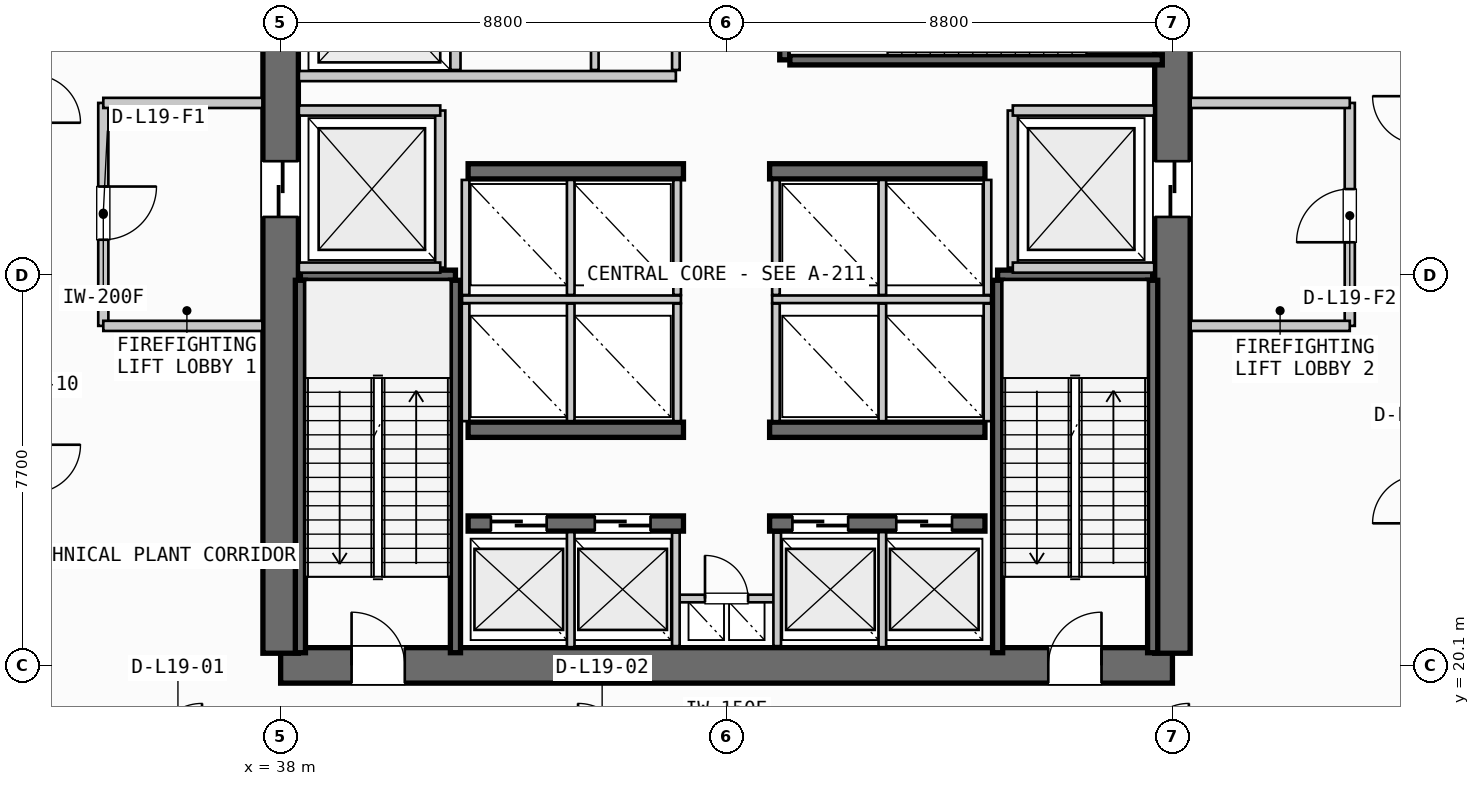
"""IFC4 building model, lengths in metres.
Left out: names, types, materials, properties, quantities, classifications, styles, units other than length and angle.
Written with IfcOpenShell. Run it as: python <this file> out.ifc"""

import sys

from ifc_helpers import new_model, si_unit, direction, frame, frame_2d, origin, place, context, subcontext, project, spatial, rectangle, extrude, source, transform, mapped, element, fill, save


model = new_model("IFC4")
c1 = context("Model", 3, precision=1e-05, world=origin(), true_north=direction((0.0, 1.0)))
c2 = subcontext(c1, "Body", "Model", "MODEL_VIEW")
j1 = project(units=[si_unit("LENGTHUNIT", "METRE"), si_unit("PLANEANGLEUNIT", "RADIAN")], contexts=[c1])
p1 = place(None, origin())
s1 = spatial("IfcSite", under=j1, at=p1, CompositionType="ELEMENT")
p2 = place(p1, origin())
s2 = spatial("IfcBuilding", under=s1, at=p2, CompositionType="ELEMENT")
p3 = place(p2, frame((0.0, 0.0, 80.4)))
s3 = spatial("IfcBuildingStorey", under=s2, at=p3, CompositionType="ELEMENT", Elevation=80.4)
p4 = place(p3, frame((38.0, 20.1, 0.0), z_axis=(0.0, 0.0, 1.0), x_axis=(1.0, 0.0, 0.0)))
e1 = element("IfcWall", 1, at=p4, inside=s3, PredefinedType="SHEAR", context=c2, shape_type="SweptSolid", body=[
    extrude(rectangle(XDim=17.6, YDim=0.7, at=frame_2d((8.8, 0.0))), origin(), (0.0, 0.0, 1.0), 4.76),
])
p5 = place(p4, frame((1.4, 0.0, 0.0)))
e2 = element("IfcOpeningElement", 2, at=p5, cuts=e1, PredefinedType="OPENING", context=c2, shape_type="SweptSolid", body=[
    extrude(rectangle(XDim=1.05, YDim=2.15, at=frame_2d((0.525, 1.075))), frame((0.0, 0.36, 0.0), z_axis=(0.0, -1.0, 0.0), x_axis=(1.0, 0.0, 0.0)), (0.0, 0.0, 1.0), 0.72),
])
p6 = place(p4, frame((15.15, 0.0, 0.0)))
e3 = element("IfcOpeningElement", 3, at=p6, cuts=e1, PredefinedType="OPENING", context=c2, shape_type="SweptSolid", body=[
    extrude(rectangle(XDim=1.05, YDim=2.15, at=frame_2d((0.525, 1.075))), frame((0.0, 0.36, 0.0), z_axis=(0.0, -1.0, 0.0), x_axis=(1.0, 0.0, 0.0)), (0.0, 0.0, 1.0), 0.72),
])
p7 = place(p3, frame((38.0, 35.26, 0.0), z_axis=(0.0, 0.0, 1.0), x_axis=(0.0, -1.0, 0.0)))
e4 = element("IfcWall", 4, at=p7, inside=s3, PredefinedType="SHEAR", context=c2, shape_type="SweptSolid", body=[
    extrude(rectangle(XDim=14.92, YDim=0.7, at=frame_2d((7.46, 0.0))), origin(), (0.0, 0.0, 1.0), 4.76),
])
p8 = place(p7, frame((5.21, 0.0, 0.0)))
e5 = element("IfcOpeningElement", 5, at=p8, cuts=e4, PredefinedType="OPENING", context=c2, shape_type="SweptSolid", body=[
    extrude(rectangle(XDim=1.1, YDim=2.2, at=frame_2d((0.55, 1.1))), frame((0.0, 0.36, 0.0), z_axis=(0.0, -1.0, 0.0), x_axis=(1.0, 0.0, 0.0)), (0.0, 0.0, 1.0), 0.72),
])
p9 = place(p3, frame((55.6, 20.34, 0.0), z_axis=(0.0, 0.0, 1.0), x_axis=(0.0, 1.0, 0.0)))
e6 = element("IfcWall", 6, at=p9, inside=s3, PredefinedType="SHEAR", context=c2, shape_type="SweptSolid", body=[
    extrude(rectangle(XDim=14.92, YDim=0.7, at=frame_2d((7.46, 0.0))), origin(), (0.0, 0.0, 1.0), 4.76),
])
p10 = place(p9, frame((12.71, 0.0, 0.0)))
e7 = element("IfcOpeningElement", 7, at=p10, cuts=e6, PredefinedType="OPENING", context=c2, shape_type="SweptSolid", body=[
    extrude(rectangle(XDim=1.05, YDim=2.15, at=frame_2d((0.525, 1.075))), frame((0.0, 0.36, 0.0), z_axis=(0.0, -1.0, 0.0), x_axis=(1.0, 0.0, 0.0)), (0.0, 0.0, 1.0), 0.72),
])
p11 = place(p9, frame((8.61, 0.0, 0.0)))
e8 = element("IfcOpeningElement", 8, at=p11, cuts=e6, PredefinedType="OPENING", context=c2, shape_type="SweptSolid", body=[
    extrude(rectangle(XDim=1.1, YDim=2.2, at=frame_2d((0.55, 1.1))), frame((0.0, 0.36, 0.0), z_axis=(0.0, -1.0, 0.0), x_axis=(1.0, 0.0, 0.0)), (0.0, 0.0, 1.0), 0.72),
])
p12 = place(p3, frame((41.7, 22.9, 0.0), z_axis=(0.0, 0.0, 1.0), x_axis=(1.0, 0.0, 0.0)))
e9 = element("IfcWall", 9, at=p12, inside=s3, PredefinedType="SHEAR", context=c2, shape_type="SweptSolid", body=[
    extrude(rectangle(XDim=4.25, YDim=0.3, at=frame_2d((2.125, 0.0))), origin(), (0.0, 0.0, 1.0), 4.76),
])
p13 = place(p12, frame((0.45, 0.0, 0.0)))
e10 = element("IfcOpeningElement", 10, at=p13, cuts=e9, PredefinedType="OPENING", context=c2, shape_type="SweptSolid", body=[
    extrude(rectangle(XDim=1.1, YDim=2.2, at=frame_2d((0.55, 1.1))), frame((0.0, 0.16, 0.0), z_axis=(0.0, -1.0, 0.0), x_axis=(1.0, 0.0, 0.0)), (0.0, 0.0, 1.0), 0.32),
])
p14 = place(p12, frame((2.5, 0.0, 0.0)))
e11 = element("IfcOpeningElement", 11, at=p14, cuts=e9, PredefinedType="OPENING", context=c2, shape_type="SweptSolid", body=[
    extrude(rectangle(XDim=1.1, YDim=2.2, at=frame_2d((0.55, 1.1))), frame((0.0, 0.16, 0.0), z_axis=(0.0, -1.0, 0.0), x_axis=(1.0, 0.0, 0.0)), (0.0, 0.0, 1.0), 0.32),
])
p15 = place(p3, frame((47.65, 22.9, 0.0), z_axis=(0.0, 0.0, 1.0), x_axis=(1.0, 0.0, 0.0)))
e12 = element("IfcWall", 12, at=p15, inside=s3, PredefinedType="SHEAR", context=c2, shape_type="SweptSolid", body=[
    extrude(rectangle(XDim=4.25, YDim=0.3, at=frame_2d((2.125, 0.0))), origin(), (0.0, 0.0, 1.0), 4.76),
])
p16 = place(p15, frame((0.45, 0.0, 0.0)))
e13 = element("IfcOpeningElement", 13, at=p16, cuts=e12, PredefinedType="OPENING", context=c2, shape_type="SweptSolid", body=[
    extrude(rectangle(XDim=1.1, YDim=2.2, at=frame_2d((0.55, 1.1))), frame((0.0, 0.16, 0.0), z_axis=(0.0, -1.0, 0.0), x_axis=(1.0, 0.0, 0.0)), (0.0, 0.0, 1.0), 0.32),
])
p17 = place(p15, frame((2.5, 0.0, 0.0)))
e14 = element("IfcOpeningElement", 14, at=p17, cuts=e12, PredefinedType="OPENING", context=c2, shape_type="SweptSolid", body=[
    extrude(rectangle(XDim=1.1, YDim=2.2, at=frame_2d((0.55, 1.1))), frame((0.0, 0.16, 0.0), z_axis=(0.0, -1.0, 0.0), x_axis=(1.0, 0.0, 0.0)), (0.0, 0.0, 1.0), 0.32),
])
for number, where, z_axis, x_axis in (
    (15, (41.7, 24.75, 0.0), (0.0, 0.0, 1.0), (1.0, 0.0, 0.0)),
    (16, (47.65, 24.75, 0.0), (0.0, 0.0, 1.0), (1.0, 0.0, 0.0)),
    (17, (41.7, 29.85, 0.0), (0.0, 0.0, 1.0), (1.0, 0.0, 0.0)),
    (18, (47.65, 29.85, 0.0), (0.0, 0.0, 1.0), (1.0, 0.0, 0.0)),
):
    element("IfcWall", number, at=place(p3, frame(where, z_axis=z_axis, x_axis=x_axis)), inside=s3, PredefinedType="SHEAR", context=c2, shape_type="SweptSolid", body=[
        extrude(rectangle(XDim=4.25, YDim=0.3, at=frame_2d((2.125, 0.0))), origin(), (0.0, 0.0, 1.0), 4.76),
    ])
p18 = place(p3, frame((38.39, 27.8, 0.0), z_axis=(0.0, 0.0, 1.0), x_axis=(1.0, 0.0, 0.0)))
e19 = element("IfcWall", 19, at=p18, inside=s3, PredefinedType="SHEAR", context=c2, shape_type="SweptSolid", body=[
    extrude(rectangle(XDim=3.06, YDim=0.2, at=frame_2d((1.53, 0.0))), origin(), (0.0, 0.0, 1.0), 4.76),
])
for number, where, z_axis, x_axis in (
    (20, (41.45, 27.7, 0.0), (0.0, 0.0, 1.0), (0.0, -1.0, 0.0)),
    (21, (38.39, 20.35, 0.0), (0.0, 0.0, 1.0), (0.0, 1.0, 0.0)),
):
    element("IfcWall", number, at=place(p3, frame(where, z_axis=z_axis, x_axis=x_axis)), inside=s3, PredefinedType="SHEAR", context=c2, shape_type="SweptSolid", body=[
        extrude(rectangle(XDim=7.35, YDim=0.2, at=frame_2d((3.675, 0.0))), origin(), (0.0, 0.0, 1.0), 4.76),
    ])
p19 = place(p3, frame((52.15, 27.8, 0.0), z_axis=(0.0, 0.0, 1.0), x_axis=(1.0, 0.0, 0.0)))
e22 = element("IfcWall", 22, at=p19, inside=s3, PredefinedType="SHEAR", context=c2, shape_type="SweptSolid", body=[
    extrude(rectangle(XDim=3.06, YDim=0.2, at=frame_2d((1.53, 0.0))), origin(), (0.0, 0.0, 1.0), 4.76),
])
for number, where, z_axis, x_axis in (
    (23, (55.21, 27.7, 0.0), (0.0, 0.0, 1.0), (0.0, -1.0, 0.0)),
    (24, (52.15, 20.35, 0.0), (0.0, 0.0, 1.0), (0.0, 1.0, 0.0)),
):
    element("IfcWall", number, at=place(p3, frame(where, z_axis=z_axis, x_axis=x_axis)), inside=s3, PredefinedType="SHEAR", context=c2, shape_type="SweptSolid", body=[
        extrude(rectangle(XDim=7.35, YDim=0.2, at=frame_2d((3.675, 0.0))), origin(), (0.0, 0.0, 1.0), 4.76),
    ])
p20 = place(p3, frame((47.95, 32.05, 0.0), z_axis=(0.0, 0.0, 1.0), x_axis=(0.0, 1.0, 0.0)))
e25 = element("IfcWall", 25, at=p20, inside=s3, PredefinedType="SHEAR", context=c2, shape_type="SweptSolid", body=[
    extrude(rectangle(XDim=3.06, YDim=0.2, at=frame_2d((1.53, 0.0))), origin(), (0.0, 0.0, 1.0), 4.76),
])
p21 = place(p3, frame((55.4, 32.05, 0.0), z_axis=(0.0, 0.0, 1.0), x_axis=(-1.0, 0.0, 0.0)))
e26 = element("IfcWall", 26, at=p21, inside=s3, PredefinedType="SHEAR", context=c2, shape_type="SweptSolid", body=[
    extrude(rectangle(XDim=7.35, YDim=0.2, at=frame_2d((3.675, 0.0))), origin(), (0.0, 0.0, 1.0), 4.76),
])
p22 = place(p3, frame((45.8, 21.42, 0.0), z_axis=(0.0, 0.0, 1.0), x_axis=(1.0, 0.0, 0.0)))
e27 = element("IfcWall", 27, at=p22, inside=s3, PredefinedType="PARTITIONING", context=c2, shape_type="SweptSolid", body=[
    extrude(rectangle(XDim=2.0, YDim=0.15, at=frame_2d((1.0, 0.0))), origin(), (0.0, 0.0, 1.0), 2.335),
])
p23 = place(p22, frame((0.575, 0.0, 0.0)))
e28 = element("IfcOpeningElement", 28, at=p23, cuts=e27, PredefinedType="OPENING", context=c2, shape_type="SweptSolid", body=[
    extrude(rectangle(XDim=0.85, YDim=2.15, at=frame_2d((0.425, 1.075))), frame((0.0, 0.085, 0.0), z_axis=(0.0, -1.0, 0.0), x_axis=(1.0, 0.0, 0.0)), (0.0, 0.0, 1.0), 0.17),
])
for number, where, z_axis, x_axis in (
    (29, (45.8, 20.48, 0.0), (0.0, 0.0, 1.0), (0.0, 1.0, 0.0)),
    (30, (47.8, 20.48, 0.0), (0.0, 0.0, 1.0), (0.0, 1.0, 0.0)),
):
    element("IfcWall", number, at=place(p3, frame(where, z_axis=z_axis, x_axis=x_axis)), inside=s3, PredefinedType="PARTITIONING", context=c2, shape_type="SweptSolid", body=[
        extrude(rectangle(XDim=2.24, YDim=0.15, at=frame_2d((1.12, 0.0))), origin(), (0.0, 0.0, 1.0), 2.335),
    ])
p24 = place(p3, frame((41.15, 27.95, 0.0), z_axis=(0.0, 0.0, 1.0), x_axis=(0.0, 1.0, 0.0)))
e31 = element("IfcWall", 31, at=p24, inside=s3, PredefinedType="PARTITIONING", context=c2, shape_type="SweptSolid", body=[
    extrude(rectangle(XDim=3.1, YDim=0.2, at=frame_2d((1.55, 0.0))), origin(), (0.0, 0.0, 1.0), 2.335),
])
for number, where, z_axis, x_axis in (
    (32, (38.36, 27.95, 0.0), (0.0, 0.0, 1.0), (1.0, 0.0, 0.0)),
    (33, (38.36, 31.05, 0.0), (0.0, 0.0, 1.0), (1.0, 0.0, 0.0)),
):
    element("IfcWall", number, at=place(p3, frame(where, z_axis=z_axis, x_axis=x_axis)), inside=s3, PredefinedType="PARTITIONING", context=c2, shape_type="SweptSolid", body=[
        extrude(rectangle(XDim=2.79, YDim=0.2, at=frame_2d((1.395, 0.0))), origin(), (0.0, 0.0, 1.0), 2.335),
    ])
p25 = place(p3, frame((34.5, 31.2, 0.0), z_axis=(0.0, 0.0, 1.0), x_axis=(0.0, -1.0, 0.0)))
e34 = element("IfcWall", 34, at=p25, inside=s3, PredefinedType="PARTITIONING", context=c2, shape_type="SweptSolid", body=[
    extrude(rectangle(XDim=4.4, YDim=0.2, at=frame_2d((2.2, 0.0))), origin(), (0.0, 0.0, 1.0), 2.335),
])
p26 = place(p25, frame((1.65, 0.0, 0.0)))
e35 = element("IfcOpeningElement", 35, at=p26, cuts=e34, PredefinedType="OPENING", context=c2, shape_type="SweptSolid", body=[
    extrude(rectangle(XDim=1.05, YDim=2.15, at=frame_2d((0.525, 1.075))), frame((0.0, 0.11, 0.0), z_axis=(0.0, -1.0, 0.0), x_axis=(1.0, 0.0, 0.0)), (0.0, 0.0, 1.0), 0.22),
])
for number, where, z_axis, x_axis in (
    (36, (34.5, 26.8, 0.0), (0.0, 0.0, 1.0), (1.0, 0.0, 0.0)),
    (37, (34.5, 31.2, 0.0), (0.0, 0.0, 1.0), (1.0, 0.0, 0.0)),
):
    element("IfcWall", number, at=place(p3, frame(where, z_axis=z_axis, x_axis=x_axis)), inside=s3, PredefinedType="PARTITIONING", context=c2, shape_type="SweptSolid", body=[
        extrude(rectangle(XDim=3.14, YDim=0.2, at=frame_2d((1.57, 0.0))), origin(), (0.0, 0.0, 1.0), 2.335),
    ])
p27 = place(p3, frame((52.45, 27.95, 0.0), z_axis=(0.0, 0.0, 1.0), x_axis=(0.0, 1.0, 0.0)))
e38 = element("IfcWall", 38, at=p27, inside=s3, PredefinedType="PARTITIONING", context=c2, shape_type="SweptSolid", body=[
    extrude(rectangle(XDim=3.1, YDim=0.2, at=frame_2d((1.55, 0.0))), origin(), (0.0, 0.0, 1.0), 2.335),
])
for number, where, z_axis, x_axis in (
    (39, (52.45, 27.95, 0.0), (0.0, 0.0, 1.0), (1.0, 0.0, 0.0)),
    (40, (52.45, 31.05, 0.0), (0.0, 0.0, 1.0), (1.0, 0.0, 0.0)),
):
    element("IfcWall", number, at=place(p3, frame(where, z_axis=z_axis, x_axis=x_axis)), inside=s3, PredefinedType="PARTITIONING", context=c2, shape_type="SweptSolid", body=[
        extrude(rectangle(XDim=2.79, YDim=0.2, at=frame_2d((1.395, 0.0))), origin(), (0.0, 0.0, 1.0), 2.335),
    ])
p28 = place(p3, frame((59.1, 26.8, 0.0), z_axis=(0.0, 0.0, 1.0), x_axis=(0.0, 1.0, 0.0)))
e41 = element("IfcWall", 41, at=p28, inside=s3, PredefinedType="PARTITIONING", context=c2, shape_type="SweptSolid", body=[
    extrude(rectangle(XDim=4.4, YDim=0.2, at=frame_2d((2.2, 0.0))), origin(), (0.0, 0.0, 1.0), 2.335),
])
p29 = place(p28, frame((1.65, 0.0, 0.0)))
e42 = element("IfcOpeningElement", 42, at=p29, cuts=e41, PredefinedType="OPENING", context=c2, shape_type="SweptSolid", body=[
    extrude(rectangle(XDim=1.05, YDim=2.15, at=frame_2d((0.525, 1.075))), frame((0.0, 0.11, 0.0), z_axis=(0.0, -1.0, 0.0), x_axis=(1.0, 0.0, 0.0)), (0.0, 0.0, 1.0), 0.22),
])
for number, where, z_axis, x_axis in (
    (43, (55.96, 26.8, 0.0), (0.0, 0.0, 1.0), (1.0, 0.0, 0.0)),
    (44, (55.96, 31.2, 0.0), (0.0, 0.0, 1.0), (1.0, 0.0, 0.0)),
):
    element("IfcWall", number, at=place(p3, frame(where, z_axis=z_axis, x_axis=x_axis)), inside=s3, PredefinedType="PARTITIONING", context=c2, shape_type="SweptSolid", body=[
        extrude(rectangle(XDim=3.14, YDim=0.2, at=frame_2d((1.57, 0.0))), origin(), (0.0, 0.0, 1.0), 2.335),
    ])
for number, where, z_axis, x_axis in (
    (45, (43.725, 20.46, 0.0), (0.0, 0.0, 1.0), (0.0, 1.0, 0.0)),
    (46, (49.875, 20.46, 0.0), (0.0, 0.0, 1.0), (0.0, 1.0, 0.0)),
):
    element("IfcWall", number, at=place(p3, frame(where, z_axis=z_axis, x_axis=x_axis)), inside=s3, PredefinedType="PARTITIONING", context=c2, shape_type="SweptSolid", body=[
        extrude(rectangle(XDim=2.27, YDim=0.15, at=frame_2d((1.135, 0.0))), origin(), (0.0, 0.0, 1.0), 2.335),
    ])
p30 = place(p3, frame((41.58, 27.325, 0.0), z_axis=(0.0, 0.0, 1.0), x_axis=(1.0, 0.0, 0.0)))
e47 = element("IfcWall", 47, at=p30, inside=s3, PredefinedType="PARTITIONING", context=c2, shape_type="SweptSolid", body=[
    extrude(rectangle(XDim=4.32, YDim=0.15, at=frame_2d((2.16, 0.0))), origin(), (0.0, 0.0, 1.0), 2.335),
])
p31 = place(p3, frame((47.7, 27.325, 0.0), z_axis=(0.0, 0.0, 1.0), x_axis=(1.0, 0.0, 0.0)))
e48 = element("IfcWall", 48, at=p31, inside=s3, PredefinedType="PARTITIONING", context=c2, shape_type="SweptSolid", body=[
    extrude(rectangle(XDim=4.32, YDim=0.15, at=frame_2d((2.16, 0.0))), origin(), (0.0, 0.0, 1.0), 2.335),
])
for number, where, z_axis, x_axis in (
    (49, (41.65, 24.92, 0.0), (0.0, 0.0, 1.0), (0.0, 1.0, 0.0)),
    (50, (43.725, 24.92, 0.0), (0.0, 0.0, 1.0), (0.0, 1.0, 0.0)),
    (51, (45.825, 24.92, 0.0), (0.0, 0.0, 1.0), (0.0, 1.0, 0.0)),
    (52, (47.775, 24.92, 0.0), (0.0, 0.0, 1.0), (0.0, 1.0, 0.0)),
    (53, (49.875, 24.92, 0.0), (0.0, 0.0, 1.0), (0.0, 1.0, 0.0)),
    (54, (51.95, 24.92, 0.0), (0.0, 0.0, 1.0), (0.0, 1.0, 0.0)),
):
    element("IfcWall", number, at=place(p3, frame(where, z_axis=z_axis, x_axis=x_axis)), inside=s3, PredefinedType="PARTITIONING", context=c2, shape_type="SweptSolid", body=[
        extrude(rectangle(XDim=2.32, YDim=0.15, at=frame_2d((1.16, 0.0))), origin(), (0.0, 0.0, 1.0), 2.335),
    ])
for number, where, z_axis, x_axis in (
    (55, (41.65, 27.41, 0.0), (0.0, 0.0, 1.0), (0.0, 1.0, 0.0)),
    (56, (43.725, 27.41, 0.0), (0.0, 0.0, 1.0), (0.0, 1.0, 0.0)),
    (57, (45.825, 27.41, 0.0), (0.0, 0.0, 1.0), (0.0, 1.0, 0.0)),
    (58, (47.775, 27.41, 0.0), (0.0, 0.0, 1.0), (0.0, 1.0, 0.0)),
    (59, (49.875, 27.41, 0.0), (0.0, 0.0, 1.0), (0.0, 1.0, 0.0)),
    (60, (51.95, 27.41, 0.0), (0.0, 0.0, 1.0), (0.0, 1.0, 0.0)),
):
    element("IfcWall", number, at=place(p3, frame(where, z_axis=z_axis, x_axis=x_axis)), inside=s3, PredefinedType="PARTITIONING", context=c2, shape_type="SweptSolid", body=[
        extrude(rectangle(XDim=2.27, YDim=0.15, at=frame_2d((1.135, 0.0))), origin(), (0.0, 0.0, 1.0), 2.335),
    ])
p32 = place(p3, frame((41.45, 31.85, 0.0), z_axis=(0.0, 0.0, 1.0), x_axis=(0.0, 1.0, 0.0)))
e61 = element("IfcWall", 61, at=p32, inside=s3, PredefinedType="PARTITIONING", context=c2, shape_type="SweptSolid", body=[
    extrude(rectangle(XDim=3.29, YDim=0.2, at=frame_2d((1.645, 0.0))), origin(), (0.0, 0.0, 1.0), 2.335),
])
p33 = place(p3, frame((38.36, 31.73, 0.0), z_axis=(0.0, 0.0, 1.0), x_axis=(1.0, 0.0, 0.0)))
e62 = element("IfcWall", 62, at=p33, inside=s3, PredefinedType="PARTITIONING", context=c2, shape_type="SweptSolid", body=[
    extrude(rectangle(XDim=7.44, YDim=0.2, at=frame_2d((3.72, 0.0))), origin(), (0.0, 0.0, 1.0), 2.335),
])
p34 = place(p3, frame((45.8, 31.85, 0.0), z_axis=(0.0, 0.0, 1.0), x_axis=(0.0, 1.0, 0.0)))
e63 = element("IfcWall", 63, at=p34, inside=s3, PredefinedType="PARTITIONING", context=c2, shape_type="SweptSolid", body=[
    extrude(rectangle(XDim=3.29, YDim=0.15, at=frame_2d((1.645, 0.0))), origin(), (0.0, 0.0, 1.0), 2.335),
])
p35 = place(p3, frame((44.2, 31.85, 0.0), z_axis=(0.0, 0.0, 1.0), x_axis=(0.0, 1.0, 0.0)))
e64 = element("IfcWall", 64, at=p35, inside=s3, PredefinedType="PLUMBINGWALL", context=c2, shape_type="SweptSolid", body=[
    extrude(rectangle(XDim=3.29, YDim=0.15, at=frame_2d((1.645, 0.0))), origin(), (0.0, 0.0, 1.0), 2.335),
])
m1 = source(origin(), c2, "Body", "SweptSolid", [
    extrude(rectangle(XDim=1.05, YDim=2.15, at=frame_2d((0.525, 1.075))), frame((0.0, 0.025, 0.0), z_axis=(0.0, -1.0, 0.0), x_axis=(1.0, 0.0, 0.0)), (0.0, 0.0, 1.0), 0.05),
])
p36 = place(p5, origin())
e65 = element("IfcDoor", 65, at=p36, inside=s3, OperationType="SINGLE_SWING_LEFT", PredefinedType="DOOR", context=c2, shape_type="MappedRepresentation", body=[
    mapped(m1, transform((0.0, 0.0, 0.0), scale=1.0)),
])
fill(e2, e65)
p37 = place(p6, origin())
e66 = element("IfcDoor", 66, at=p37, inside=s3, OperationType="SINGLE_SWING_RIGHT", PredefinedType="DOOR", context=c2, shape_type="MappedRepresentation", body=[
    mapped(m1, transform((0.0, 0.0, 0.0), scale=1.0)),
])
fill(e3, e66)
m2 = source(origin(), c2, "Body", "SweptSolid", [
    extrude(rectangle(XDim=1.1, YDim=2.2, at=frame_2d((0.55, 1.1))), frame((0.0, 0.025, 0.0), z_axis=(0.0, -1.0, 0.0), x_axis=(1.0, 0.0, 0.0)), (0.0, 0.0, 1.0), 0.05),
])
p38 = place(p8, origin())
e67 = element("IfcDoor", 67, at=p38, inside=s3, OperationType="SLIDING_TO_LEFT", PredefinedType="DOOR", context=c2, shape_type="MappedRepresentation", body=[
    mapped(m2, transform((0.0, 0.0, 0.0), scale=1.0)),
])
fill(e5, e67)
p39 = place(p11, origin())
e68 = element("IfcDoor", 68, at=p39, inside=s3, OperationType="SLIDING_TO_RIGHT", PredefinedType="DOOR", context=c2, shape_type="MappedRepresentation", body=[
    mapped(m2, transform((0.0, 0.0, 0.0), scale=1.0)),
])
fill(e8, e68)
p40 = place(p13, origin())
e69 = element("IfcDoor", 69, at=p40, inside=s3, OperationType="SLIDING_TO_LEFT", PredefinedType="DOOR", context=c2, shape_type="MappedRepresentation", body=[
    mapped(m2, transform((0.0, 0.0, 0.0), scale=1.0)),
])
fill(e10, e69)
p41 = place(p14, origin())
e70 = element("IfcDoor", 70, at=p41, inside=s3, OperationType="SLIDING_TO_LEFT", PredefinedType="DOOR", context=c2, shape_type="MappedRepresentation", body=[
    mapped(m2, transform((0.0, 0.0, 0.0), scale=1.0)),
])
fill(e11, e70)
p42 = place(p16, origin())
e71 = element("IfcDoor", 71, at=p42, inside=s3, OperationType="SLIDING_TO_LEFT", PredefinedType="DOOR", context=c2, shape_type="MappedRepresentation", body=[
    mapped(m2, transform((0.0, 0.0, 0.0), scale=1.0)),
])
fill(e13, e71)
p43 = place(p17, origin())
e72 = element("IfcDoor", 72, at=p43, inside=s3, OperationType="SLIDING_TO_LEFT", PredefinedType="DOOR", context=c2, shape_type="MappedRepresentation", body=[
    mapped(m2, transform((0.0, 0.0, 0.0), scale=1.0)),
])
fill(e14, e72)
p44 = place(p26, origin())
e73 = element("IfcDoor", 73, at=p44, inside=s3, OperationType="SINGLE_SWING_LEFT", PredefinedType="DOOR", context=c2, shape_type="MappedRepresentation", body=[
    mapped(m1, transform((0.0, 0.0, 0.0), scale=1.0)),
])
fill(e35, e73)
p45 = place(p29, origin())
e74 = element("IfcDoor", 74, at=p45, inside=s3, OperationType="SINGLE_SWING_LEFT", PredefinedType="DOOR", context=c2, shape_type="MappedRepresentation", body=[
    mapped(m1, transform((0.0, 0.0, 0.0), scale=1.0)),
])
fill(e42, e74)
m3 = source(origin(), c2, "Body", "SweptSolid", [
    extrude(rectangle(XDim=0.85, YDim=2.15, at=frame_2d((0.425, 1.075))), frame((0.0, 0.025, 0.0), z_axis=(0.0, -1.0, 0.0), x_axis=(1.0, 0.0, 0.0)), (0.0, 0.0, 1.0), 0.05),
])
p46 = place(p23, origin())
e75 = element("IfcDoor", 75, at=p46, inside=s3, OperationType="SINGLE_SWING_LEFT", PredefinedType="DOOR", context=c2, shape_type="MappedRepresentation", body=[
    mapped(m3, transform((0.0, 0.0, 0.0), scale=1.0)),
])
fill(e28, e75)
save(model, sys.argv[1])
